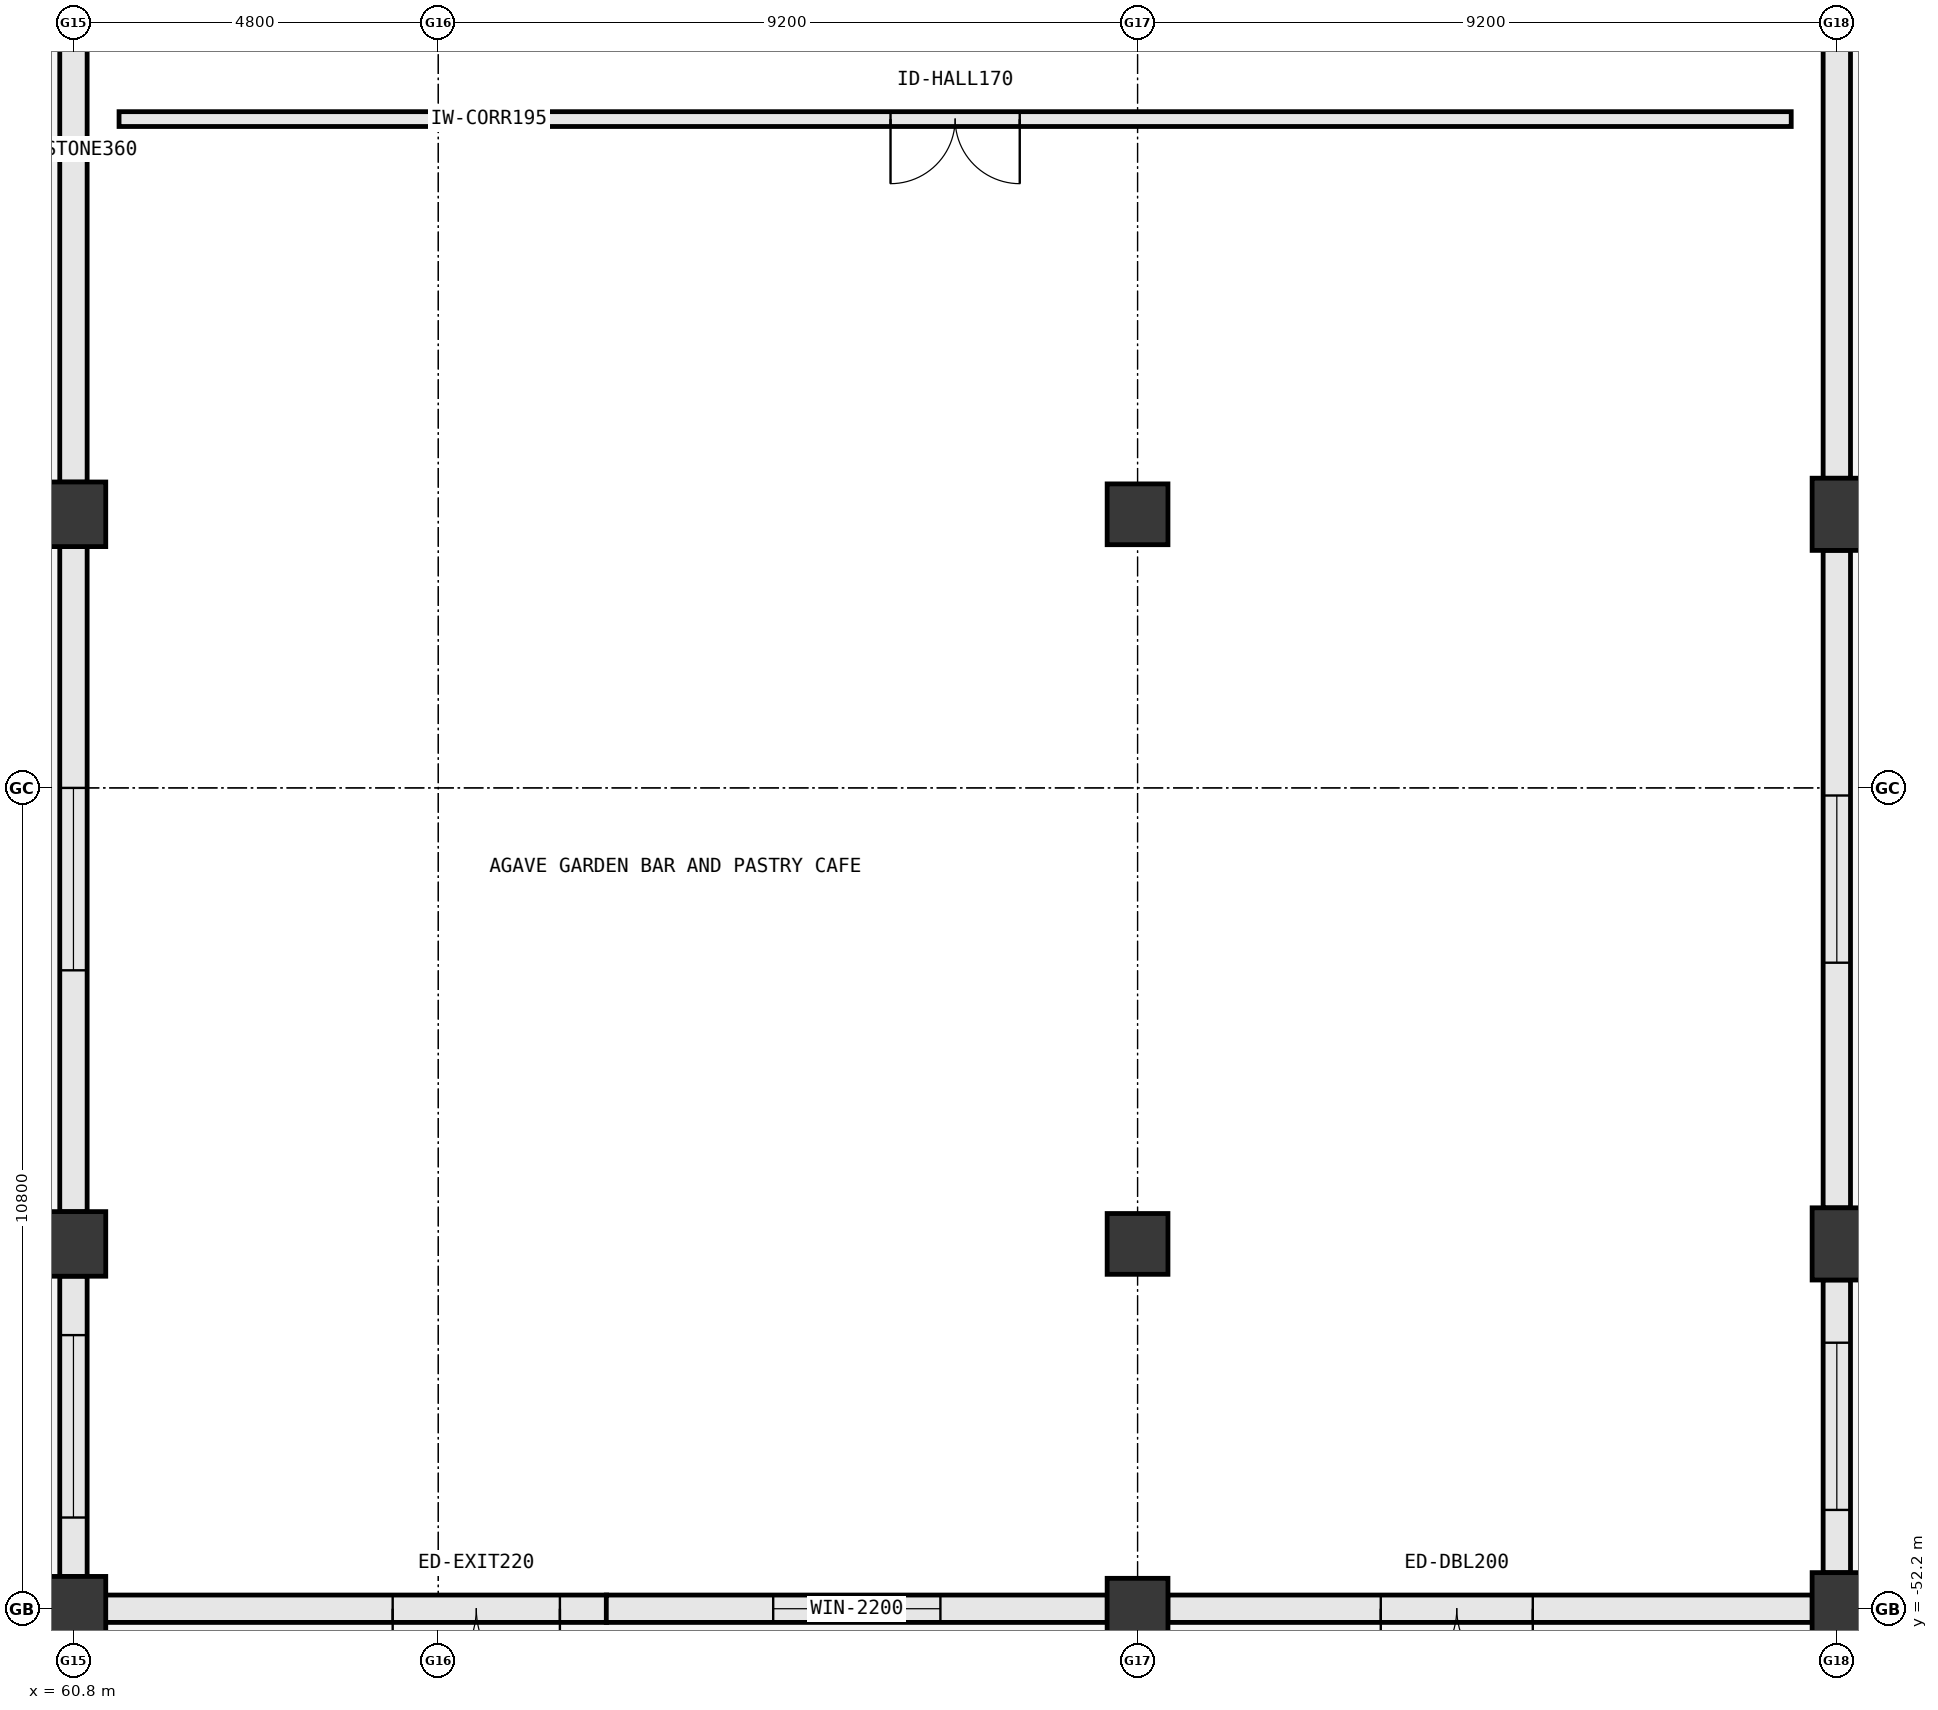
"""IFC4 building model, lengths in metres.
Left out: names, types, materials, properties, quantities, classifications, styles, units other than length and angle.
Written with IfcOpenShell. Run it as: python <this file> out.ifc"""

import sys

from ifc_helpers import new_model, si_unit, direction, frame, frame_2d, origin, origin_2d, place, context, subcontext, project, spatial, rectangle, extrude, element, fill, save


model = new_model("IFC4")
c1 = context("Model", 3, precision=1e-05, world=origin(), true_north=direction((0.0, 1.0)))
c2 = subcontext(c1, "Body", "Model", "MODEL_VIEW")
j1 = project(units=[si_unit("LENGTHUNIT", "METRE"), si_unit("PLANEANGLEUNIT", "RADIAN")], contexts=[c1])
p1 = place(None, origin())
s1 = spatial("IfcSite", under=j1, at=p1, CompositionType="ELEMENT")
p2 = place(p1, origin())
s2 = spatial("IfcBuilding", under=s1, at=p2, CompositionType="ELEMENT")
p3 = place(p2, origin())
s3 = spatial("IfcBuildingStorey", under=s2, at=p3, CompositionType="ELEMENT", Elevation=0.0)
for number, where, z_axis, x_axis in (
    (1, (60.8, -52.2, 0.0), (0.0, 0.0, 1.0), (1.0, 0.0, 0.0)),
    (2, (60.8, -47.4, 0.0), (0.0, 0.0, 1.0), (1.0, 0.0, 0.0)),
    (3, (60.8, -37.8, 0.0), (0.0, 0.0, 1.0), (1.0, 0.0, 0.0)),
):
    element("IfcColumn", number, at=place(p3, frame(where, z_axis=z_axis, x_axis=x_axis)), inside=s3, PredefinedType="COLUMN", context=c2, shape_type="SweptSolid", body=[
        extrude(rectangle(XDim=0.85, YDim=0.85, at=origin_2d()), origin(), (0.0, 0.0, 1.0), 5.4),
    ])
for number, where, z_axis, x_axis in (
    (4, (74.8, -52.2, 0.0), (0.0, 0.0, 1.0), (1.0, 0.0, 0.0)),
    (5, (74.8, -47.4, 0.0), (0.0, 0.0, 1.0), (1.0, 0.0, 0.0)),
    (6, (74.8, -37.8, 0.0), (0.0, 0.0, 1.0), (1.0, 0.0, 0.0)),
):
    element("IfcColumn", number, at=place(p3, frame(where, z_axis=z_axis, x_axis=x_axis)), inside=s3, PredefinedType="COLUMN", context=c2, shape_type="SweptSolid", body=[
        extrude(rectangle(XDim=0.8, YDim=0.8, at=origin_2d()), origin(), (0.0, 0.0, 1.0), 5.4),
    ])
for number, where, z_axis, x_axis in (
    (7, (84.0, -52.2, 0.0), (0.0, 0.0, 1.0), (1.0, 0.0, 0.0)),
    (8, (84.0, -47.4, 0.0), (0.0, 0.0, 1.0), (1.0, 0.0, 0.0)),
    (9, (84.0, -37.8, 0.0), (0.0, 0.0, 1.0), (1.0, 0.0, 0.0)),
):
    element("IfcColumn", number, at=place(p3, frame(where, z_axis=z_axis, x_axis=x_axis)), inside=s3, PredefinedType="PILASTER", context=c2, shape_type="SweptSolid", body=[
        extrude(rectangle(XDim=0.65, YDim=0.95, at=origin_2d()), origin(), (0.0, 0.0, 1.0), 5.4),
    ])
p4 = place(p3, frame((61.223, -52.2, 0.0), z_axis=(0.0, 0.0, 1.0), x_axis=(1.0, 0.0, 0.0)))
e10 = element("IfcWall", 10, at=p4, inside=s3, PredefinedType="STANDARD", context=c2, shape_type="SweptSolid", body=[
    extrude(rectangle(XDim=6.592, YDim=0.36, at=frame_2d((3.296, 0.0))), origin(), (0.0, 0.0, 1.0), 4.503),
])
p5 = place(p4, frame((3.777, 0.0, 0.0)))
e11 = element("IfcOpeningElement", 11, at=p5, cuts=e10, PredefinedType="OPENING", context=c2, shape_type="SweptSolid", body=[
    extrude(rectangle(XDim=2.2, YDim=2.4, at=frame_2d((1.1, 1.2))), frame((0.0, 0.192, 0.0), z_axis=(0.0, -1.0, 0.0), x_axis=(1.0, 0.0, 0.0)), (0.0, 0.0, 1.0), 0.384),
])
p6 = place(p3, frame((67.811, -52.2, 0.0), z_axis=(0.0, 0.0, 1.0), x_axis=(1.0, 0.0, 0.0)))
e12 = element("IfcWall", 12, at=p6, inside=s3, PredefinedType="STANDARD", context=c2, shape_type="SweptSolid", body=[
    extrude(rectangle(XDim=6.592, YDim=0.36, at=frame_2d((3.296, 0.0))), origin(), (0.0, 0.0, 1.0), 4.503),
])
p7 = place(p6, frame((2.196, 0.0, 0.85)))
e13 = element("IfcOpeningElement", 13, at=p7, cuts=e12, PredefinedType="OPENING", context=c2, shape_type="SweptSolid", body=[
    extrude(rectangle(XDim=2.2, YDim=2.0, at=frame_2d((1.1, 1.0))), frame((0.0, 0.192, 0.0), z_axis=(0.0, -1.0, 0.0), x_axis=(1.0, 0.0, 0.0)), (0.0, 0.0, 1.0), 0.384),
])
p8 = place(p3, frame((75.198, -52.2, 0.0), z_axis=(0.0, 0.0, 1.0), x_axis=(1.0, 0.0, 0.0)))
e14 = element("IfcWall", 14, at=p8, inside=s3, PredefinedType="STANDARD", context=c2, shape_type="SweptSolid", body=[
    extrude(rectangle(XDim=8.479, YDim=0.36, at=frame_2d((4.24, 0.0))), origin(), (0.0, 0.0, 1.0), 4.503),
])
p9 = place(p8, frame((2.802, 0.0, 0.0)))
e15 = element("IfcOpeningElement", 15, at=p9, cuts=e14, PredefinedType="OPENING", context=c2, shape_type="SweptSolid", body=[
    extrude(rectangle(XDim=2.0, YDim=2.4, at=frame_2d((1.0, 1.2))), frame((0.0, 0.192, 0.0), z_axis=(0.0, -1.0, 0.0), x_axis=(1.0, 0.0, 0.0)), (0.0, 0.0, 1.0), 0.384),
])
p10 = place(p3, frame((84.0, -51.727, 0.0), z_axis=(0.0, 0.0, 1.0), x_axis=(0.0, 1.0, 0.0)))
e16 = element("IfcWall", 16, at=p10, inside=s3, PredefinedType="STANDARD", context=c2, shape_type="SweptSolid", body=[
    extrude(rectangle(XDim=3.854, YDim=0.36, at=frame_2d((1.927, 0.0))), origin(), (0.0, 0.0, 1.0), 4.652),
])
p11 = place(p10, frame((0.827, 0.0, 0.85)))
e17 = element("IfcOpeningElement", 17, at=p11, cuts=e16, PredefinedType="OPENING", context=c2, shape_type="SweptSolid", body=[
    extrude(rectangle(XDim=2.2, YDim=2.0, at=frame_2d((1.1, 1.0))), frame((0.0, 0.192, 0.0), z_axis=(0.0, -1.0, 0.0), x_axis=(1.0, 0.0, 0.0)), (0.0, 0.0, 1.0), 0.384),
])
p12 = place(p3, frame((84.0, -46.927, 0.0), z_axis=(0.0, 0.0, 1.0), x_axis=(0.0, 1.0, 0.0)))
e18 = element("IfcWall", 18, at=p12, inside=s3, PredefinedType="STANDARD", context=c2, shape_type="SweptSolid", body=[
    extrude(rectangle(XDim=8.654, YDim=0.36, at=frame_2d((4.327, 0.0))), origin(), (0.0, 0.0, 1.0), 4.652),
])
p13 = place(p12, frame((3.227, 0.0, 0.85)))
e19 = element("IfcOpeningElement", 19, at=p13, cuts=e18, PredefinedType="OPENING", context=c2, shape_type="SweptSolid", body=[
    extrude(rectangle(XDim=2.2, YDim=2.0, at=frame_2d((1.1, 1.0))), frame((0.0, 0.192, 0.0), z_axis=(0.0, -1.0, 0.0), x_axis=(1.0, 0.0, 0.0)), (0.0, 0.0, 1.0), 0.384),
])
p14 = place(p3, frame((84.0, -37.327, 0.0), z_axis=(0.0, 0.0, 1.0), x_axis=(0.0, 1.0, 0.0)))
e20 = element("IfcWall", 20, at=p14, inside=s3, PredefinedType="STANDARD", context=c2, shape_type="SweptSolid", body=[
    extrude(rectangle(XDim=8.654, YDim=0.36, at=frame_2d((4.327, 0.0))), origin(), (0.0, 0.0, 1.0), 4.652),
])
p15 = place(p3, frame((60.8, -28.623, 0.0), z_axis=(0.0, 0.0, 1.0), x_axis=(0.0, -1.0, 0.0)))
e21 = element("IfcWall", 21, at=p15, inside=s3, PredefinedType="STANDARD", context=c2, shape_type="SweptSolid", body=[
    extrude(rectangle(XDim=8.754, YDim=0.36, at=frame_2d((4.377, 0.0))), origin(), (0.0, 0.0, 1.0), 4.475),
])
p16 = place(p3, frame((60.8, -38.223, 0.0), z_axis=(0.0, 0.0, 1.0), x_axis=(0.0, -1.0, 0.0)))
e22 = element("IfcWall", 22, at=p16, inside=s3, PredefinedType="STANDARD", context=c2, shape_type="SweptSolid", body=[
    extrude(rectangle(XDim=8.754, YDim=0.36, at=frame_2d((4.377, 0.0))), origin(), (0.0, 0.0, 1.0), 4.475),
])
p17 = place(p16, frame((3.177, 0.0, 0.85)))
e23 = element("IfcOpeningElement", 23, at=p17, cuts=e22, PredefinedType="OPENING", context=c2, shape_type="SweptSolid", body=[
    extrude(rectangle(XDim=2.4, YDim=2.05, at=frame_2d((1.2, 1.025))), frame((0.0, 0.192, 0.0), z_axis=(0.0, -1.0, 0.0), x_axis=(1.0, 0.0, 0.0)), (0.0, 0.0, 1.0), 0.384),
])
p18 = place(p3, frame((60.8, -47.823, 0.0), z_axis=(0.0, 0.0, 1.0), x_axis=(0.0, -1.0, 0.0)))
e24 = element("IfcWall", 24, at=p18, inside=s3, PredefinedType="STANDARD", context=c2, shape_type="SweptSolid", body=[
    extrude(rectangle(XDim=3.954, YDim=0.36, at=frame_2d((1.977, 0.0))), origin(), (0.0, 0.0, 1.0), 4.575),
])
p19 = place(p18, frame((0.777, 0.0, 0.85)))
e25 = element("IfcOpeningElement", 25, at=p19, cuts=e24, PredefinedType="OPENING", context=c2, shape_type="SweptSolid", body=[
    extrude(rectangle(XDim=2.4, YDim=2.05, at=frame_2d((1.2, 1.025))), frame((0.0, 0.192, 0.0), z_axis=(0.0, -1.0, 0.0), x_axis=(1.0, 0.0, 0.0)), (0.0, 0.0, 1.0), 0.384),
])
p20 = place(p3, frame((83.4, -32.6, 0.0), z_axis=(0.0, 0.0, 1.0), x_axis=(-1.0, 0.0, 0.0)))
e26 = element("IfcWall", 26, at=p20, inside=s3, PredefinedType="PARTITIONING", context=c2, shape_type="SweptSolid", body=[
    extrude(rectangle(XDim=22.0, YDim=0.195, at=frame_2d((11.0, 0.0))), origin(), (0.0, 0.0, 1.0), 5.12),
])
p21 = place(p20, frame((10.15, 0.0, 0.0)))
e27 = element("IfcOpeningElement", 27, at=p21, cuts=e26, PredefinedType="OPENING", context=c2, shape_type="SweptSolid", body=[
    extrude(rectangle(XDim=1.7, YDim=2.3, at=frame_2d((0.85, 1.15))), frame((0.0, 0.11, 0.0), z_axis=(0.0, -1.0, 0.0), x_axis=(1.0, 0.0, 0.0)), (0.0, 0.0, 1.0), 0.219),
])
p22 = place(p5, frame((2.2, 0.0, 0.0), z_axis=(0.0, 0.0, 1.0), x_axis=(-1.0, 0.0, 0.0)))
e28 = element("IfcDoor", 28, at=p22, inside=s3, OperationType="DOUBLE_DOOR_SINGLE_SWING", PredefinedType="DOOR", context=c2, shape_type="SweptSolid", body=[
    extrude(rectangle(XDim=2.2, YDim=2.4, at=frame_2d((1.1, 1.2))), frame((0.0, 0.025, 0.0), z_axis=(0.0, -1.0, 0.0), x_axis=(1.0, 0.0, 0.0)), (0.0, 0.0, 1.0), 0.05),
])
fill(e11, e28)
p23 = place(p7, origin())
e29 = element("IfcWindow", 29, at=p23, inside=s3, PartitioningType="DOUBLE_PANEL_VERTICAL", PredefinedType="WINDOW", context=c2, shape_type="SweptSolid", body=[
    extrude(rectangle(XDim=2.2, YDim=2.0, at=frame_2d((1.1, 1.0))), frame((0.0, 0.03, 0.0), z_axis=(0.0, -1.0, 0.0), x_axis=(1.0, 0.0, 0.0)), (0.0, 0.0, 1.0), 0.06),
])
fill(e13, e29)
p24 = place(p9, frame((2.0, 0.0, 0.0), z_axis=(0.0, 0.0, 1.0), x_axis=(-1.0, 0.0, 0.0)))
e30 = element("IfcDoor", 30, at=p24, inside=s3, OperationType="DOUBLE_DOOR_SINGLE_SWING", PredefinedType="DOOR", context=c2, shape_type="SweptSolid", body=[
    extrude(rectangle(XDim=2.0, YDim=2.4, at=frame_2d((1.0, 1.2))), frame((0.0, 0.025, 0.0), z_axis=(0.0, -1.0, 0.0), x_axis=(1.0, 0.0, 0.0)), (0.0, 0.0, 1.0), 0.05),
])
fill(e15, e30)
p25 = place(p11, origin())
e31 = element("IfcWindow", 31, at=p25, inside=s3, PartitioningType="DOUBLE_PANEL_VERTICAL", PredefinedType="WINDOW", context=c2, shape_type="SweptSolid", body=[
    extrude(rectangle(XDim=2.2, YDim=2.0, at=frame_2d((1.1, 1.0))), frame((0.0, 0.03, 0.0), z_axis=(0.0, -1.0, 0.0), x_axis=(1.0, 0.0, 0.0)), (0.0, 0.0, 1.0), 0.06),
])
fill(e17, e31)
p26 = place(p13, origin())
e32 = element("IfcWindow", 32, at=p26, inside=s3, PartitioningType="DOUBLE_PANEL_VERTICAL", PredefinedType="WINDOW", context=c2, shape_type="SweptSolid", body=[
    extrude(rectangle(XDim=2.2, YDim=2.0, at=frame_2d((1.1, 1.0))), frame((0.0, 0.03, 0.0), z_axis=(0.0, -1.0, 0.0), x_axis=(1.0, 0.0, 0.0)), (0.0, 0.0, 1.0), 0.06),
])
fill(e19, e32)
p27 = place(p17, origin())
e33 = element("IfcWindow", 33, at=p27, inside=s3, PartitioningType="DOUBLE_PANEL_VERTICAL", PredefinedType="WINDOW", context=c2, shape_type="SweptSolid", body=[
    extrude(rectangle(XDim=2.4, YDim=2.05, at=frame_2d((1.2, 1.025))), frame((0.0, 0.03, 0.0), z_axis=(0.0, -1.0, 0.0), x_axis=(1.0, 0.0, 0.0)), (0.0, 0.0, 1.0), 0.06),
])
fill(e23, e33)
p28 = place(p19, origin())
e34 = element("IfcWindow", 34, at=p28, inside=s3, PartitioningType="DOUBLE_PANEL_VERTICAL", PredefinedType="WINDOW", context=c2, shape_type="SweptSolid", body=[
    extrude(rectangle(XDim=2.4, YDim=2.05, at=frame_2d((1.2, 1.025))), frame((0.0, 0.03, 0.0), z_axis=(0.0, -1.0, 0.0), x_axis=(1.0, 0.0, 0.0)), (0.0, 0.0, 1.0), 0.06),
])
fill(e25, e34)
p29 = place(p21, origin())
e35 = element("IfcDoor", 35, at=p29, inside=s3, OperationType="DOUBLE_DOOR_SINGLE_SWING", PredefinedType="DOOR", context=c2, shape_type="SweptSolid", body=[
    extrude(rectangle(XDim=1.7, YDim=2.3, at=frame_2d((0.85, 1.15))), frame((0.0, 0.025, 0.0), z_axis=(0.0, -1.0, 0.0), x_axis=(1.0, 0.0, 0.0)), (0.0, 0.0, 1.0), 0.05),
])
fill(e27, e35)
save(model, sys.argv[1])
